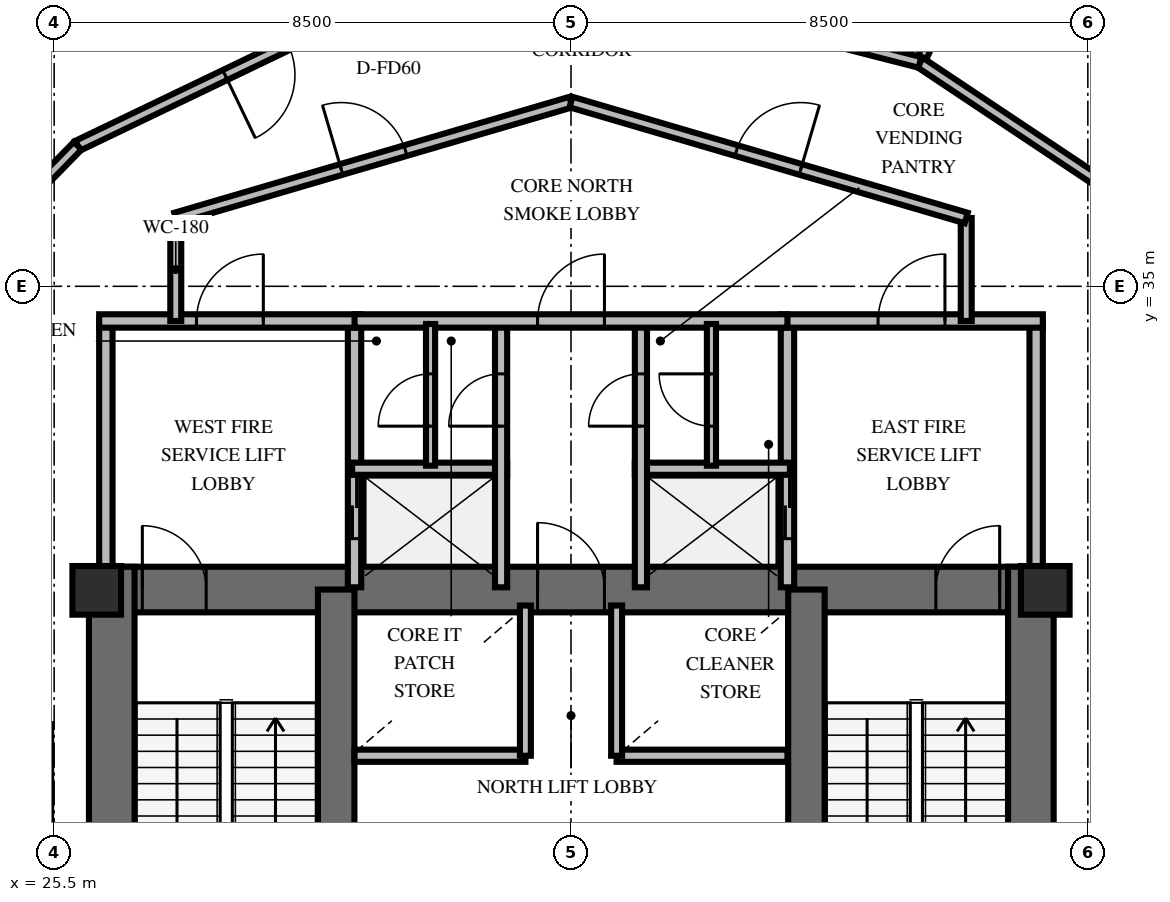
"""IFC4 building model, lengths in metres.
Left out: names, types, materials, properties, quantities, classifications, styles, units other than length and angle.
Written with IfcOpenShell. Run it as: python <this file> out.ifc"""

import sys

from ifc_helpers import new_model, si_unit, direction, frame, frame_2d, origin, origin_2d, place, context, subcontext, project, spatial, rectangle, extrude, element, fill, save


model = new_model("IFC4")
c1 = context("Model", 3, precision=1e-05, world=origin(), true_north=direction((0.0, 1.0)))
c2 = subcontext(c1, "Body", "Model", "MODEL_VIEW")
j1 = project(units=[si_unit("LENGTHUNIT", "METRE"), si_unit("PLANEANGLEUNIT", "RADIAN")], contexts=[c1])
p1 = place(None, origin())
s1 = spatial("IfcSite", under=j1, at=p1, CompositionType="ELEMENT")
p2 = place(p1, origin())
s2 = spatial("IfcBuilding", under=s1, at=p2, CompositionType="ELEMENT")
p3 = place(p2, frame((0.0, 0.0, 141.8)))
s3 = spatial("IfcBuildingStorey", under=s2, at=p3, CompositionType="ELEMENT", Elevation=141.8)
p4 = place(p3, frame((26.072, 30.013, 0.0), z_axis=(0.0, 0.0, 1.0), x_axis=(1.0, 0.0, 0.0)))
e1 = element("IfcWall", 1, at=p4, inside=s3, PredefinedType="SHEAR", context=c2, shape_type="SweptSolid", body=[
    extrude(rectangle(XDim=15.866, YDim=0.75, at=frame_2d((7.933, 0.0))), origin(), (0.0, 0.0, 1.0), 4.0),
])
p5 = place(p4, frame((0.878, 0.0, 0.0)))
e2 = element("IfcOpeningElement", 2, at=p5, cuts=e1, PredefinedType="OPENING", context=c2, shape_type="SweptSolid", body=[
    extrude(rectangle(XDim=1.05, YDim=2.15, at=frame_2d((0.525, 1.075))), frame((0.0, 0.385, 0.0), z_axis=(0.0, -1.0, 0.0), x_axis=(1.0, 0.0, 0.0)), (0.0, 0.0, 1.0), 0.77),
])
p6 = place(p4, frame((13.928, 0.0, 0.0)))
e3 = element("IfcOpeningElement", 3, at=p6, cuts=e1, PredefinedType="OPENING", context=c2, shape_type="SweptSolid", body=[
    extrude(rectangle(XDim=1.05, YDim=2.15, at=frame_2d((0.525, 1.075))), frame((0.0, 0.385, 0.0), z_axis=(0.0, -1.0, 0.0), x_axis=(1.0, 0.0, 0.0)), (0.0, 0.0, 1.0), 0.77),
])
p7 = place(p4, frame((7.378, 0.0, 0.0)))
e4 = element("IfcOpeningElement", 4, at=p7, cuts=e1, PredefinedType="OPENING", context=c2, shape_type="SweptSolid", body=[
    extrude(rectangle(XDim=1.1, YDim=2.15, at=frame_2d((0.55, 1.075))), frame((0.0, 0.385, 0.0), z_axis=(0.0, -1.0, 0.0), x_axis=(1.0, 0.0, 0.0)), (0.0, 0.0, 1.0), 0.77),
])
for number, where, z_axis, x_axis in (
    (5, (26.447, 19.812, 0.0), (0.0, 0.0, 1.0), (0.0, 1.0, 0.0)),
    (6, (41.563, 19.812, 0.0), (0.0, 0.0, 1.0), (0.0, 1.0, 0.0)),
):
    element("IfcWall", number, at=place(p3, frame(where, z_axis=z_axis, x_axis=x_axis)), inside=s3, PredefinedType="SHEAR", context=c2, shape_type="SweptSolid", body=[
        extrude(rectangle(XDim=10.576, YDim=0.75, at=frame_2d((5.288, 0.0))), origin(), (0.0, 0.0, 1.0), 4.0),
    ])
for number, where, z_axis, x_axis in (
    (7, (30.138, 20.187, 0.0), (0.0, 0.0, 1.0), (0.0, 1.0, 0.0)),
    (8, (37.872, 20.187, 0.0), (0.0, 0.0, 1.0), (0.0, 1.0, 0.0)),
):
    element("IfcWall", number, at=place(p3, frame(where, z_axis=z_axis, x_axis=x_axis)), inside=s3, PredefinedType="SHEAR", context=c2, shape_type="SweptSolid", body=[
        extrude(rectangle(XDim=9.826, YDim=0.6, at=frame_2d((4.913, 0.0))), origin(), (0.0, 0.0, 1.0), 4.0),
    ])
for number, where, z_axis, x_axis in (
    (9, (26.2, 30.0, 0.0), (0.0, 0.0, 1.0), (1.0, 0.0, 0.0)),
    (10, (41.8, 30.0, 0.0), (0.0, 0.0, 1.0), (1.0, 0.0, 0.0)),
):
    element("IfcColumn", number, at=place(p3, frame(where, z_axis=z_axis, x_axis=x_axis)), inside=s3, PredefinedType="PILASTER", context=c2, shape_type="SweptSolid", body=[
        extrude(rectangle(XDim=0.8, YDim=0.8, at=origin_2d()), origin(), (0.0, 0.0, 1.0), 4.0),
    ])
p8 = place(p3, frame((26.35, 30.05, 0.0), z_axis=(0.0, 0.0, 1.0), x_axis=(0.0, 1.0, 0.0)))
e11 = element("IfcWall", 11, at=p8, inside=s3, PredefinedType="SOLIDWALL", context=c2, shape_type="SweptSolid", body=[
    extrude(rectangle(XDim=4.38, YDim=0.22, at=frame_2d((2.19, 0.0))), origin(), (0.0, 0.0, 1.0), 2.8),
])
p9 = place(p3, frame((30.44, 30.05, 0.0), z_axis=(0.0, 0.0, 1.0), x_axis=(0.0, 1.0, 0.0)))
e12 = element("IfcWall", 12, at=p9, inside=s3, PredefinedType="SOLIDWALL", context=c2, shape_type="SweptSolid", body=[
    extrude(rectangle(XDim=4.38, YDim=0.22, at=frame_2d((2.19, 0.0))), origin(), (0.0, 0.0, 1.0), 2.8),
])
p10 = place(p9, frame((0.8, 0.0, 0.0)))
e13 = element("IfcOpeningElement", 13, at=p10, cuts=e12, PredefinedType="OPENING", context=c2, shape_type="SweptSolid", body=[
    extrude(rectangle(XDim=1.05, YDim=2.1, at=frame_2d((0.525, 1.05))), frame((0.0, 0.12, 0.0), z_axis=(0.0, -1.0, 0.0), x_axis=(1.0, 0.0, 0.0)), (0.0, 0.0, 1.0), 0.24),
])
p11 = place(p3, frame((26.24, 34.43, 0.0), z_axis=(0.0, 0.0, 1.0), x_axis=(1.0, 0.0, 0.0)))
e14 = element("IfcWall", 14, at=p11, inside=s3, PredefinedType="SOLIDWALL", context=c2, shape_type="SweptSolid", body=[
    extrude(rectangle(XDim=4.31, YDim=0.22, at=frame_2d((2.155, 0.0))), origin(), (0.0, 0.0, 1.0), 2.8),
])
p12 = place(p11, frame((1.6, 0.0, 0.0)))
e15 = element("IfcOpeningElement", 15, at=p12, cuts=e14, PredefinedType="OPENING", context=c2, shape_type="SweptSolid", body=[
    extrude(rectangle(XDim=1.1, YDim=2.15, at=frame_2d((0.55, 1.075))), frame((0.0, 0.12, 0.0), z_axis=(0.0, -1.0, 0.0), x_axis=(1.0, 0.0, 0.0)), (0.0, 0.0, 1.0), 0.24),
])
p13 = place(p3, frame((30.4, 32.0, 0.0), z_axis=(0.0, 0.0, 1.0), x_axis=(1.0, 0.0, 0.0)))
e16 = element("IfcWall", 16, at=p13, inside=s3, PredefinedType="SOLIDWALL", context=c2, shape_type="SweptSolid", body=[
    extrude(rectangle(XDim=2.55, YDim=0.2, at=frame_2d((1.275, 0.0))), origin(), (0.0, 0.0, 1.0), 2.8),
])
p14 = place(p3, frame((32.85, 30.05, 0.0), z_axis=(0.0, 0.0, 1.0), x_axis=(0.0, 1.0, 0.0)))
e17 = element("IfcWall", 17, at=p14, inside=s3, PredefinedType="SOLIDWALL", context=c2, shape_type="SweptSolid", body=[
    extrude(rectangle(XDim=4.38, YDim=0.2, at=frame_2d((2.19, 0.0))), origin(), (0.0, 0.0, 1.0), 2.8),
])
p15 = place(p14, frame((2.65, 0.0, 0.0)))
e18 = element("IfcOpeningElement", 18, at=p15, cuts=e17, PredefinedType="OPENING", context=c2, shape_type="SweptSolid", body=[
    extrude(rectangle(XDim=0.86, YDim=2.05, at=frame_2d((0.43, 1.025))), frame((0.0, 0.11, 0.0), z_axis=(0.0, -1.0, 0.0), x_axis=(1.0, 0.0, 0.0)), (0.0, 0.0, 1.0), 0.22),
])
p16 = place(p3, frame((37.56, 30.05, 0.0), z_axis=(0.0, 0.0, 1.0), x_axis=(0.0, 1.0, 0.0)))
e19 = element("IfcWall", 19, at=p16, inside=s3, PredefinedType="SOLIDWALL", context=c2, shape_type="SweptSolid", body=[
    extrude(rectangle(XDim=4.38, YDim=0.22, at=frame_2d((2.19, 0.0))), origin(), (0.0, 0.0, 1.0), 2.8),
])
p17 = place(p16, frame((0.8, 0.0, 0.0)))
e20 = element("IfcOpeningElement", 20, at=p17, cuts=e19, PredefinedType="OPENING", context=c2, shape_type="SweptSolid", body=[
    extrude(rectangle(XDim=1.05, YDim=2.1, at=frame_2d((0.525, 1.05))), frame((0.0, 0.12, 0.0), z_axis=(0.0, -1.0, 0.0), x_axis=(1.0, 0.0, 0.0)), (0.0, 0.0, 1.0), 0.24),
])
p18 = place(p3, frame((41.65, 30.05, 0.0), z_axis=(0.0, 0.0, 1.0), x_axis=(0.0, 1.0, 0.0)))
e21 = element("IfcWall", 21, at=p18, inside=s3, PredefinedType="SOLIDWALL", context=c2, shape_type="SweptSolid", body=[
    extrude(rectangle(XDim=4.38, YDim=0.22, at=frame_2d((2.19, 0.0))), origin(), (0.0, 0.0, 1.0), 2.8),
])
p19 = place(p3, frame((37.45, 34.43, 0.0), z_axis=(0.0, 0.0, 1.0), x_axis=(1.0, 0.0, 0.0)))
e22 = element("IfcWall", 22, at=p19, inside=s3, PredefinedType="SOLIDWALL", context=c2, shape_type="SweptSolid", body=[
    extrude(rectangle(XDim=4.31, YDim=0.22, at=frame_2d((2.155, 0.0))), origin(), (0.0, 0.0, 1.0), 2.8),
])
p20 = place(p19, frame((1.6, 0.0, 0.0)))
e23 = element("IfcOpeningElement", 23, at=p20, cuts=e22, PredefinedType="OPENING", context=c2, shape_type="SweptSolid", body=[
    extrude(rectangle(XDim=1.1, YDim=2.15, at=frame_2d((0.55, 1.075))), frame((0.0, 0.12, 0.0), z_axis=(0.0, -1.0, 0.0), x_axis=(1.0, 0.0, 0.0)), (0.0, 0.0, 1.0), 0.24),
])
p21 = place(p3, frame((35.05, 32.0, 0.0), z_axis=(0.0, 0.0, 1.0), x_axis=(1.0, 0.0, 0.0)))
e24 = element("IfcWall", 24, at=p21, inside=s3, PredefinedType="SOLIDWALL", context=c2, shape_type="SweptSolid", body=[
    extrude(rectangle(XDim=2.55, YDim=0.2, at=frame_2d((1.275, 0.0))), origin(), (0.0, 0.0, 1.0), 2.8),
])
p22 = place(p3, frame((35.15, 30.05, 0.0), z_axis=(0.0, 0.0, 1.0), x_axis=(0.0, 1.0, 0.0)))
e25 = element("IfcWall", 25, at=p22, inside=s3, PredefinedType="SOLIDWALL", context=c2, shape_type="SweptSolid", body=[
    extrude(rectangle(XDim=4.38, YDim=0.2, at=frame_2d((2.19, 0.0))), origin(), (0.0, 0.0, 1.0), 2.8),
])
p23 = place(p22, frame((2.65, 0.0, 0.0)))
e26 = element("IfcOpeningElement", 26, at=p23, cuts=e25, PredefinedType="OPENING", context=c2, shape_type="SweptSolid", body=[
    extrude(rectangle(XDim=0.86, YDim=2.05, at=frame_2d((0.43, 1.025))), frame((0.0, 0.11, 0.0), z_axis=(0.0, -1.0, 0.0), x_axis=(1.0, 0.0, 0.0)), (0.0, 0.0, 1.0), 0.22),
])
p24 = place(p3, frame((30.44, 34.43, 0.0), z_axis=(0.0, 0.0, 1.0), x_axis=(1.0, 0.0, 0.0)))
e27 = element("IfcWall", 27, at=p24, inside=s3, PredefinedType="SOLIDWALL", context=c2, shape_type="SweptSolid", body=[
    extrude(rectangle(XDim=7.12, YDim=0.22, at=frame_2d((3.56, 0.0))), origin(), (0.0, 0.0, 1.0), 2.8),
])
p25 = place(p24, frame((3.01, 0.0, 0.0)))
e28 = element("IfcOpeningElement", 28, at=p25, cuts=e27, PredefinedType="OPENING", context=c2, shape_type="SweptSolid", body=[
    extrude(rectangle(XDim=1.1, YDim=2.15, at=frame_2d((0.55, 1.075))), frame((0.0, 0.12, 0.0), z_axis=(0.0, -1.0, 0.0), x_axis=(1.0, 0.0, 0.0)), (0.0, 0.0, 1.0), 0.24),
])
p26 = place(p3, frame((31.69, 32.05, 0.0), z_axis=(0.0, 0.0, 1.0), x_axis=(0.0, 1.0, 0.0)))
e29 = element("IfcWall", 29, at=p26, inside=s3, PredefinedType="PARTITIONING", context=c2, shape_type="SweptSolid", body=[
    extrude(rectangle(XDim=2.33, YDim=0.15, at=frame_2d((1.165, 0.0))), origin(), (0.0, 0.0, 1.0), 2.8),
])
p27 = place(p26, frame((0.65, 0.0, 0.0)))
e30 = element("IfcOpeningElement", 30, at=p27, cuts=e29, PredefinedType="OPENING", context=c2, shape_type="SweptSolid", body=[
    extrude(rectangle(XDim=0.86, YDim=2.05, at=frame_2d((0.43, 1.025))), frame((0.0, 0.085, 0.0), z_axis=(0.0, -1.0, 0.0), x_axis=(1.0, 0.0, 0.0)), (0.0, 0.0, 1.0), 0.17),
])
p28 = place(p3, frame((36.31, 32.05, 0.0), z_axis=(0.0, 0.0, 1.0), x_axis=(0.0, 1.0, 0.0)))
e31 = element("IfcWall", 31, at=p28, inside=s3, PredefinedType="PARTITIONING", context=c2, shape_type="SweptSolid", body=[
    extrude(rectangle(XDim=2.33, YDim=0.15, at=frame_2d((1.165, 0.0))), origin(), (0.0, 0.0, 1.0), 2.8),
])
p29 = place(p28, frame((0.65, 0.0, 0.0)))
e32 = element("IfcOpeningElement", 32, at=p29, cuts=e31, PredefinedType="OPENING", context=c2, shape_type="SweptSolid", body=[
    extrude(rectangle(XDim=0.86, YDim=2.05, at=frame_2d((0.43, 1.025))), frame((0.0, 0.085, 0.0), z_axis=(0.0, -1.0, 0.0), x_axis=(1.0, 0.0, 0.0)), (0.0, 0.0, 1.0), 0.17),
])
p30 = place(p3, frame((30.44, 27.28, 0.0), z_axis=(0.0, 0.0, 1.0), x_axis=(1.0, 0.0, 0.0)))
e33 = element("IfcWall", 33, at=p30, inside=s3, PredefinedType="SOLIDWALL", context=c2, shape_type="SweptSolid", body=[
    extrude(rectangle(XDim=2.81, YDim=0.2, at=frame_2d((1.405, 0.0))), origin(), (0.0, 0.0, 1.0), 2.8),
])
p31 = place(p3, frame((33.25, 27.28, 0.0), z_axis=(0.0, 0.0, 1.0), x_axis=(0.0, 1.0, 0.0)))
e34 = element("IfcWall", 34, at=p31, inside=s3, PredefinedType="SOLIDWALL", context=c2, shape_type="SweptSolid", body=[
    extrude(rectangle(XDim=2.47, YDim=0.18, at=frame_2d((1.235, 0.0))), origin(), (0.0, 0.0, 1.0), 2.8),
])
p32 = place(p3, frame((34.75, 27.28, 0.0), z_axis=(0.0, 0.0, 1.0), x_axis=(1.0, 0.0, 0.0)))
e35 = element("IfcWall", 35, at=p32, inside=s3, PredefinedType="SOLIDWALL", context=c2, shape_type="SweptSolid", body=[
    extrude(rectangle(XDim=2.81, YDim=0.2, at=frame_2d((1.405, 0.0))), origin(), (0.0, 0.0, 1.0), 2.8),
])
p33 = place(p3, frame((34.75, 27.28, 0.0), z_axis=(0.0, 0.0, 1.0), x_axis=(0.0, 1.0, 0.0)))
e36 = element("IfcWall", 36, at=p33, inside=s3, PredefinedType="SOLIDWALL", context=c2, shape_type="SweptSolid", body=[
    extrude(rectangle(XDim=2.47, YDim=0.18, at=frame_2d((1.235, 0.0))), origin(), (0.0, 0.0, 1.0), 2.8),
])
for number, where, z_axis, x_axis in (
    (37, (27.5, 34.43, 0.0), (0.0, 0.0, 1.0), (0.0, 1.0, 0.0)),
    (38, (40.5, 36.123, 0.0), (0.0, 0.0, 1.0), (0.0, -1.0, 0.0)),
):
    element("IfcWall", number, at=place(p3, frame(where, z_axis=z_axis, x_axis=x_axis)), inside=s3, PredefinedType="PARTITIONING", context=c2, shape_type="SweptSolid", body=[
        extrude(rectangle(XDim=1.693, YDim=0.18, at=frame_2d((0.846, 0.0))), origin(), (0.0, 0.0, 1.0), 2.8),
    ])
p34 = place(p3, frame((27.5, 36.123, 0.0), z_axis=(0.0, 0.0, 1.0), x_axis=(0.959546654541, 0.281549671923, 0.0)))
e39 = element("IfcWall", 39, at=p34, inside=s3, PredefinedType="PARTITIONING", context=c2, shape_type="SweptSolid", body=[
    extrude(rectangle(XDim=6.774, YDim=0.18, at=frame_2d((3.387, 0.0))), origin(), (0.0, 0.0, 1.0), 2.8),
])
p35 = place(p34, frame((2.837, 0.0, 0.0)))
e40 = element("IfcOpeningElement", 40, at=p35, cuts=e39, PredefinedType="OPENING", context=c2, shape_type="SweptSolid", body=[
    extrude(rectangle(XDim=1.1, YDim=2.15, at=frame_2d((0.55, 1.075))), frame((0.0, 0.1, 0.0), z_axis=(0.0, -1.0, 0.0), x_axis=(1.0, 0.0, 0.0)), (0.0, 0.0, 1.0), 0.2),
])
p36 = place(p3, frame((34.0, 38.03, 0.0), z_axis=(0.0, 0.0, 1.0), x_axis=(0.959546654541, -0.281549671923, 0.0)))
e41 = element("IfcWall", 41, at=p36, inside=s3, PredefinedType="PARTITIONING", context=c2, shape_type="SweptSolid", body=[
    extrude(rectangle(XDim=6.774, YDim=0.18, at=frame_2d((3.387, 0.0))), origin(), (0.0, 0.0, 1.0), 2.8),
])
p37 = place(p36, frame((2.837, 0.0, 0.0)))
e42 = element("IfcOpeningElement", 42, at=p37, cuts=e41, PredefinedType="OPENING", context=c2, shape_type="SweptSolid", body=[
    extrude(rectangle(XDim=1.1, YDim=2.15, at=frame_2d((0.55, 1.075))), frame((0.0, 0.1, 0.0), z_axis=(0.0, -1.0, 0.0), x_axis=(1.0, 0.0, 0.0)), (0.0, 0.0, 1.0), 0.2),
])
p38 = place(p3, frame((39.739, 38.682, 0.0), z_axis=(0.0, 0.0, 1.0), x_axis=(0.412310301836, 0.911043475911, 0.0)))
e43 = element("IfcWall", 43, at=p38, inside=s3, PredefinedType="PARTITIONING", context=c2, shape_type="SweptSolid", body=[
    extrude(rectangle(XDim=8.605, YDim=0.15, at=frame_2d((4.302, 0.0))), origin(), (0.0, 0.0, 1.0), 2.8),
])
p39 = place(p3, frame((43.496, 36.178, 0.0), z_axis=(0.0, 0.0, 1.0), x_axis=(-0.832133474619, 0.55457540553, 0.0)))
e44 = element("IfcWall", 44, at=p39, inside=s3, PredefinedType="PARTITIONING", context=c2, shape_type="SweptSolid", body=[
    extrude(rectangle(XDim=4.515, YDim=0.18, at=frame_2d((2.257, 0.0))), origin(), (0.0, 0.0, 1.0), 2.8),
])
p40 = place(p3, frame((39.739, 38.682, 0.0), z_axis=(0.0, 0.0, 1.0), x_axis=(-0.968793962031, 0.247867422491, 0.0)))
e45 = element("IfcWall", 45, at=p40, inside=s3, PredefinedType="PARTITIONING", context=c2, shape_type="SweptSolid", body=[
    extrude(rectangle(XDim=4.834, YDim=0.18, at=frame_2d((2.417, 0.0))), origin(), (0.0, 0.0, 1.0), 2.8),
])
p41 = place(p3, frame((30.245, 39.404, 0.0), z_axis=(0.0, 0.0, 1.0), x_axis=(-0.901444237196, -0.432895238165, 0.0)))
e46 = element("IfcWall", 46, at=p41, inside=s3, PredefinedType="PARTITIONING", context=c2, shape_type="SweptSolid", body=[
    extrude(rectangle(XDim=4.834, YDim=0.18, at=frame_2d((2.417, 0.0))), origin(), (0.0, 0.0, 1.0), 2.8),
])
p42 = place(p41, frame((0.996, 0.0, 0.0)))
e47 = element("IfcOpeningElement", 47, at=p42, cuts=e46, PredefinedType="OPENING", context=c2, shape_type="SweptSolid", body=[
    extrude(rectangle(XDim=1.15, YDim=2.15, at=frame_2d((0.575, 1.075))), frame((0.0, 0.1, 0.0), z_axis=(0.0, -1.0, 0.0), x_axis=(1.0, 0.0, 0.0)), (0.0, 0.0, 1.0), 0.2),
])
p43 = place(p3, frame((25.887, 37.311, 0.0), z_axis=(0.0, 0.0, 1.0), x_axis=(-0.699031567745, -0.715090810524, 0.0)))
e48 = element("IfcWall", 48, at=p43, inside=s3, PredefinedType="PARTITIONING", context=c2, shape_type="SweptSolid", body=[
    extrude(rectangle(XDim=4.834, YDim=0.18, at=frame_2d((2.417, 0.0))), origin(), (0.0, 0.0, 1.0), 2.8),
])
p44 = place(p5, origin())
e49 = element("IfcDoor", 49, at=p44, inside=s3, OperationType="SINGLE_SWING_LEFT", PredefinedType="DOOR", context=c2, shape_type="SweptSolid", body=[
    extrude(rectangle(XDim=1.05, YDim=2.15, at=frame_2d((0.525, 1.075))), frame((0.0, 0.025, 0.0), z_axis=(0.0, -1.0, 0.0), x_axis=(1.0, 0.0, 0.0)), (0.0, 0.0, 1.0), 0.05),
])
fill(e2, e49)
p45 = place(p6, origin())
e50 = element("IfcDoor", 50, at=p45, inside=s3, OperationType="SINGLE_SWING_RIGHT", PredefinedType="DOOR", context=c2, shape_type="SweptSolid", body=[
    extrude(rectangle(XDim=1.05, YDim=2.15, at=frame_2d((0.525, 1.075))), frame((0.0, 0.025, 0.0), z_axis=(0.0, -1.0, 0.0), x_axis=(1.0, 0.0, 0.0)), (0.0, 0.0, 1.0), 0.05),
])
fill(e3, e50)
p46 = place(p7, origin())
e51 = element("IfcDoor", 51, at=p46, inside=s3, OperationType="SINGLE_SWING_LEFT", PredefinedType="DOOR", context=c2, shape_type="SweptSolid", body=[
    extrude(rectangle(XDim=1.1, YDim=2.15, at=frame_2d((0.55, 1.075))), frame((0.0, 0.025, 0.0), z_axis=(0.0, -1.0, 0.0), x_axis=(1.0, 0.0, 0.0)), (0.0, 0.0, 1.0), 0.05),
])
fill(e4, e51)
p47 = place(p12, origin())
e52 = element("IfcDoor", 52, at=p47, inside=s3, OperationType="SINGLE_SWING_RIGHT", PredefinedType="DOOR", context=c2, shape_type="SweptSolid", body=[
    extrude(rectangle(XDim=1.1, YDim=2.15, at=frame_2d((0.55, 1.075))), frame((0.0, 0.025, 0.0), z_axis=(0.0, -1.0, 0.0), x_axis=(1.0, 0.0, 0.0)), (0.0, 0.0, 1.0), 0.05),
])
fill(e15, e52)
p48 = place(p10, origin())
e53 = element("IfcDoor", 53, at=p48, inside=s3, OperationType="DOUBLE_DOOR_SLIDING", PredefinedType="USERDEFINED", context=c2, shape_type="SweptSolid", body=[
    extrude(rectangle(XDim=1.05, YDim=2.1, at=frame_2d((0.525, 1.05))), frame((0.0, 0.025, 0.0), z_axis=(0.0, -1.0, 0.0), x_axis=(1.0, 0.0, 0.0)), (0.0, 0.0, 1.0), 0.05),
])
fill(e13, e53)
p49 = place(p15, origin())
e54 = element("IfcDoor", 54, at=p49, inside=s3, OperationType="SINGLE_SWING_LEFT", PredefinedType="TRAPDOOR", context=c2, shape_type="SweptSolid", body=[
    extrude(rectangle(XDim=0.86, YDim=2.05, at=frame_2d((0.43, 1.025))), frame((0.0, 0.025, 0.0), z_axis=(0.0, -1.0, 0.0), x_axis=(1.0, 0.0, 0.0)), (0.0, 0.0, 1.0), 0.05),
])
fill(e18, e54)
p50 = place(p20, origin())
e55 = element("IfcDoor", 55, at=p50, inside=s3, OperationType="SINGLE_SWING_RIGHT", PredefinedType="DOOR", context=c2, shape_type="SweptSolid", body=[
    extrude(rectangle(XDim=1.1, YDim=2.15, at=frame_2d((0.55, 1.075))), frame((0.0, 0.025, 0.0), z_axis=(0.0, -1.0, 0.0), x_axis=(1.0, 0.0, 0.0)), (0.0, 0.0, 1.0), 0.05),
])
fill(e23, e55)
p51 = place(p17, origin())
e56 = element("IfcDoor", 56, at=p51, inside=s3, OperationType="DOUBLE_DOOR_SLIDING", PredefinedType="USERDEFINED", context=c2, shape_type="SweptSolid", body=[
    extrude(rectangle(XDim=1.05, YDim=2.1, at=frame_2d((0.525, 1.05))), frame((0.0, 0.025, 0.0), z_axis=(0.0, -1.0, 0.0), x_axis=(1.0, 0.0, 0.0)), (0.0, 0.0, 1.0), 0.05),
])
fill(e20, e56)
p52 = place(p23, origin())
e57 = element("IfcDoor", 57, at=p52, inside=s3, OperationType="SINGLE_SWING_LEFT", PredefinedType="TRAPDOOR", context=c2, shape_type="SweptSolid", body=[
    extrude(rectangle(XDim=0.86, YDim=2.05, at=frame_2d((0.43, 1.025))), frame((0.0, 0.025, 0.0), z_axis=(0.0, -1.0, 0.0), x_axis=(1.0, 0.0, 0.0)), (0.0, 0.0, 1.0), 0.05),
])
fill(e26, e57)
p53 = place(p25, origin())
e58 = element("IfcDoor", 58, at=p53, inside=s3, OperationType="SINGLE_SWING_RIGHT", PredefinedType="DOOR", context=c2, shape_type="SweptSolid", body=[
    extrude(rectangle(XDim=1.1, YDim=2.15, at=frame_2d((0.55, 1.075))), frame((0.0, 0.025, 0.0), z_axis=(0.0, -1.0, 0.0), x_axis=(1.0, 0.0, 0.0)), (0.0, 0.0, 1.0), 0.05),
])
fill(e28, e58)
p54 = place(p27, origin())
e59 = element("IfcDoor", 59, at=p54, inside=s3, OperationType="SINGLE_SWING_LEFT", PredefinedType="TRAPDOOR", context=c2, shape_type="SweptSolid", body=[
    extrude(rectangle(XDim=0.86, YDim=2.05, at=frame_2d((0.43, 1.025))), frame((0.0, 0.025, 0.0), z_axis=(0.0, -1.0, 0.0), x_axis=(1.0, 0.0, 0.0)), (0.0, 0.0, 1.0), 0.05),
])
fill(e30, e59)
p55 = place(p29, origin())
e60 = element("IfcDoor", 60, at=p55, inside=s3, OperationType="SINGLE_SWING_RIGHT", PredefinedType="TRAPDOOR", context=c2, shape_type="SweptSolid", body=[
    extrude(rectangle(XDim=0.86, YDim=2.05, at=frame_2d((0.43, 1.025))), frame((0.0, 0.025, 0.0), z_axis=(0.0, -1.0, 0.0), x_axis=(1.0, 0.0, 0.0)), (0.0, 0.0, 1.0), 0.05),
])
fill(e32, e60)
p56 = place(p35, origin())
e61 = element("IfcDoor", 61, at=p56, inside=s3, OperationType="SINGLE_SWING_LEFT", PredefinedType="DOOR", context=c2, shape_type="SweptSolid", body=[
    extrude(rectangle(XDim=1.1, YDim=2.15, at=frame_2d((0.55, 1.075))), frame((0.0, 0.025, 0.0), z_axis=(0.0, -1.0, 0.0), x_axis=(1.0, 0.0, 0.0)), (0.0, 0.0, 1.0), 0.05),
])
fill(e40, e61)
p57 = place(p37, origin())
e62 = element("IfcDoor", 62, at=p57, inside=s3, OperationType="SINGLE_SWING_RIGHT", PredefinedType="DOOR", context=c2, shape_type="SweptSolid", body=[
    extrude(rectangle(XDim=1.1, YDim=2.15, at=frame_2d((0.55, 1.075))), frame((0.0, 0.025, 0.0), z_axis=(0.0, -1.0, 0.0), x_axis=(1.0, 0.0, 0.0)), (0.0, 0.0, 1.0), 0.05),
])
fill(e42, e62)
p58 = place(p42, origin())
e63 = element("IfcDoor", 63, at=p58, inside=s3, OperationType="SINGLE_SWING_RIGHT", PredefinedType="DOOR", context=c2, shape_type="SweptSolid", body=[
    extrude(rectangle(XDim=1.15, YDim=2.15, at=frame_2d((0.575, 1.075))), frame((0.0, 0.025, 0.0), z_axis=(0.0, -1.0, 0.0), x_axis=(1.0, 0.0, 0.0)), (0.0, 0.0, 1.0), 0.05),
])
fill(e47, e63)
save(model, sys.argv[1])
